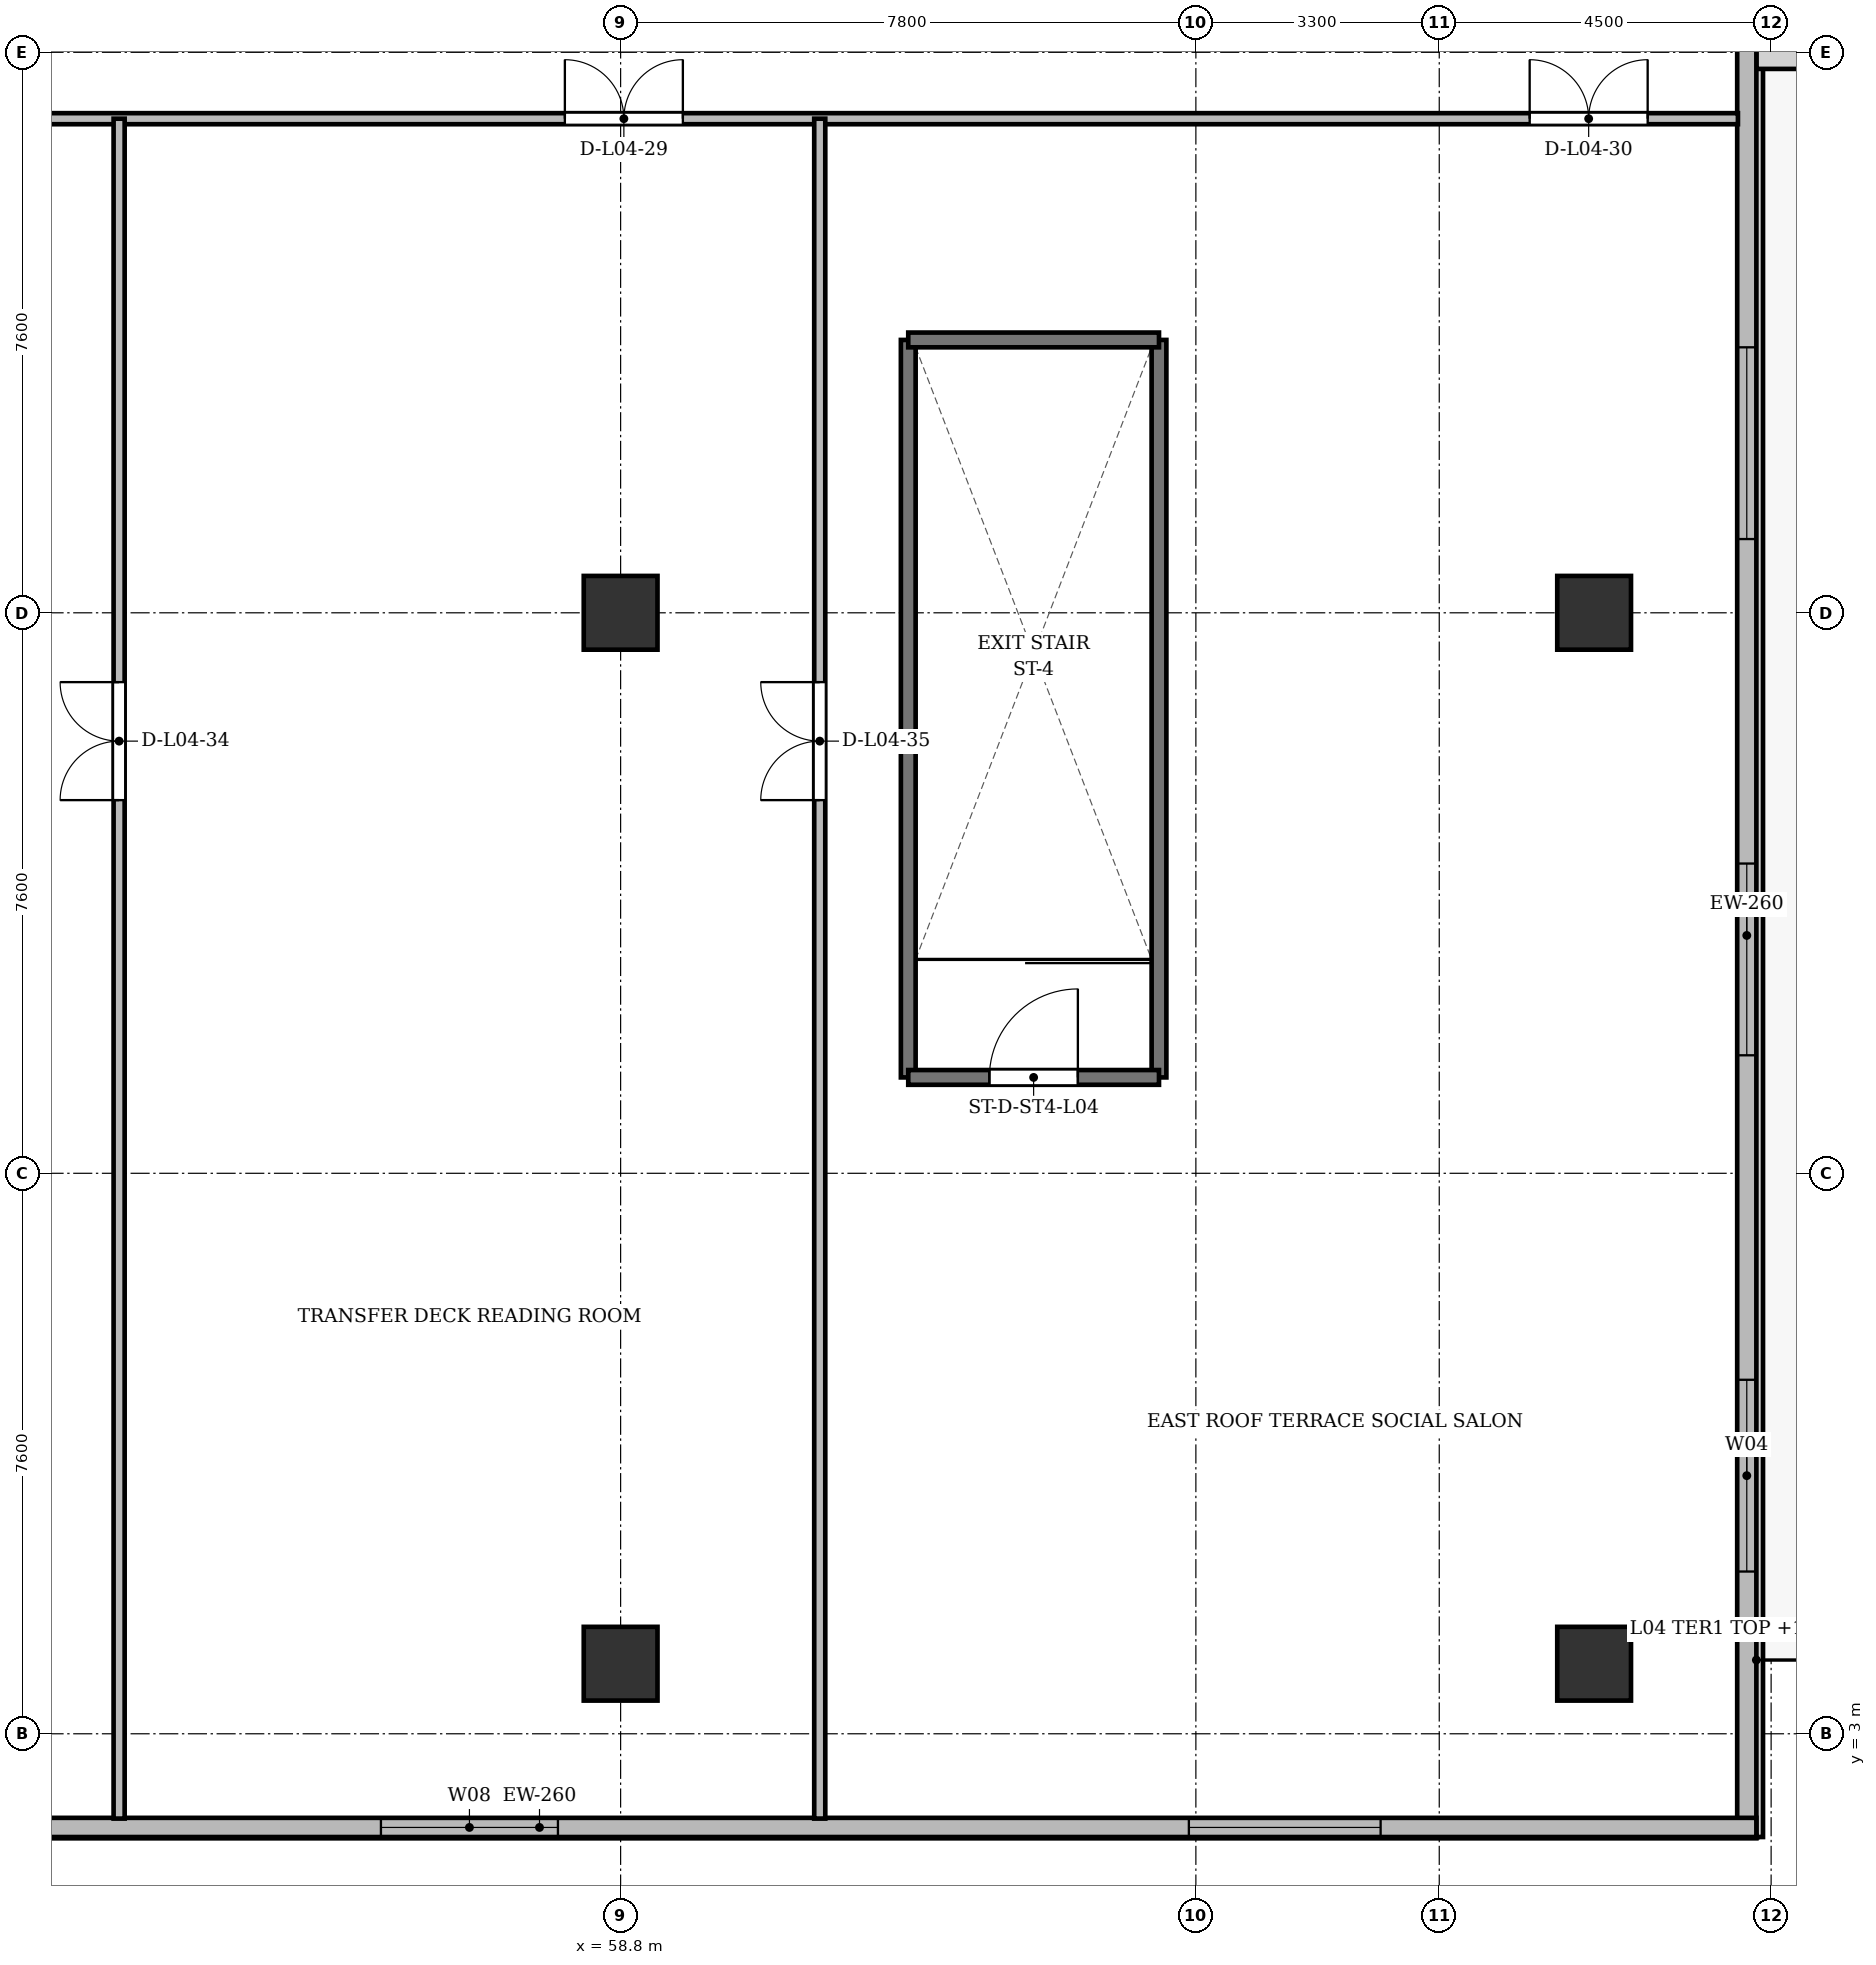
"""IFC4 building model, lengths in metres.
Left out: names, types, materials, properties, quantities, classifications, styles, units other than length and angle.
Written with IfcOpenShell. Run it as: python <this file> out.ifc"""

import sys

from ifc_helpers import new_model, si_unit, direction, frame, frame_2d, origin, origin_2d, place, context, subcontext, project, spatial, rectangle, extrude, source, transform, mapped, element, fill, save


model = new_model("IFC4")
c1 = context("Model", 3, precision=1e-05, world=origin(), true_north=direction((0.0, 1.0)))
c2 = subcontext(c1, "Body", "Model", "MODEL_VIEW")
j1 = project(units=[si_unit("LENGTHUNIT", "METRE"), si_unit("PLANEANGLEUNIT", "RADIAN")], contexts=[c1])
p1 = place(None, origin())
s1 = spatial("IfcSite", under=j1, at=p1, CompositionType="ELEMENT")
p2 = place(p1, origin())
s2 = spatial("IfcBuilding", under=s1, at=p2, CompositionType="ELEMENT")
p3 = place(p2, frame((0.0, 0.0, 18.7)))
s3 = spatial("IfcBuildingStorey", under=s2, at=p3, CompositionType="ELEMENT", Elevation=18.7)
m1 = source(origin(), c2, "Body", "SweptSolid", [
    extrude(rectangle(XDim=1.0, YDim=1.0, at=origin_2d()), origin(), (0.0, 0.0, 1.0), 4.8),
])
for number, where, z_axis, x_axis in (
    (1, (58.8, 3.95, 0.0), (0.0, 0.0, 1.0), (1.0, 0.0, 0.0)),
    (2, (58.8, 18.2, 0.0), (0.0, 0.0, 1.0), (1.0, 0.0, 0.0)),
    (3, (72.0, 3.95, 0.0), (0.0, 0.0, 1.0), (1.0, 0.0, 0.0)),
    (4, (72.0, 18.2, 0.0), (0.0, 0.0, 1.0), (1.0, 0.0, 0.0)),
):
    element("IfcColumn", number, at=place(p3, frame(where, z_axis=z_axis, x_axis=x_axis)), inside=s3, PredefinedType="COLUMN", context=c2, shape_type="MappedRepresentation", body=[
        mapped(m1, transform((0.0, 0.0, 0.0), x_axis=(1.0, 0.0, 0.0), y_axis=(0.0, 1.0, 0.0), z_axis=(0.0, 0.0, 1.0), scale=1.0)),
    ])
p4 = place(p3, frame((74.07, 52.6, 0.0), z_axis=(0.0, 0.0, 1.0), x_axis=(0.0, -1.0, 0.0)))
e5 = element("IfcWall", 5, at=p4, inside=s3, PredefinedType="SOLIDWALL", context=c2, shape_type="SweptSolid", body=[
    extrude(rectangle(XDim=51.0, YDim=0.26, at=frame_2d((25.5, 0.0))), origin(), (0.0, 0.0, 1.0), 2.62),
])
p5 = place(p4, frame((24.75, 0.0, 0.0)))
e6 = element("IfcOpeningElement", 6, at=p5, cuts=e5, PredefinedType="OPENING", context=c2, shape_type="SweptSolid", body=[
    extrude(rectangle(XDim=1.5, YDim=2.25, at=frame_2d((0.75, 1.125))), frame((0.0, 0.14, 0.0), z_axis=(0.0, -1.0, 0.0), x_axis=(1.0, 0.0, 0.0)), (0.0, 0.0, 1.0), 0.28),
])
p6 = place(p4, frame((44.8, 0.0, 0.92)))
e7 = element("IfcOpeningElement", 7, at=p6, cuts=e5, PredefinedType="OPENING", context=c2, shape_type="SweptSolid", body=[
    extrude(rectangle(XDim=2.6, YDim=1.6, at=frame_2d((1.3, 0.8))), frame((0.0, 0.14, 0.0), z_axis=(0.0, -1.0, 0.0), x_axis=(1.0, 0.0, 0.0)), (0.0, 0.0, 1.0), 0.28),
])
p7 = place(p4, frame((37.8, 0.0, 0.92)))
e8 = element("IfcOpeningElement", 8, at=p7, cuts=e5, PredefinedType="OPENING", context=c2, shape_type="SweptSolid", body=[
    extrude(rectangle(XDim=2.6, YDim=1.6, at=frame_2d((1.3, 0.8))), frame((0.0, 0.14, 0.0), z_axis=(0.0, -1.0, 0.0), x_axis=(1.0, 0.0, 0.0)), (0.0, 0.0, 1.0), 0.28),
])
p8 = place(p4, frame((30.8, 0.0, 0.92)))
e9 = element("IfcOpeningElement", 9, at=p8, cuts=e5, PredefinedType="OPENING", context=c2, shape_type="SweptSolid", body=[
    extrude(rectangle(XDim=2.6, YDim=1.6, at=frame_2d((1.3, 0.8))), frame((0.0, 0.14, 0.0), z_axis=(0.0, -1.0, 0.0), x_axis=(1.0, 0.0, 0.0)), (0.0, 0.0, 1.0), 0.28),
])
p9 = place(p4, frame((14.5, 0.0, 0.92)))
e10 = element("IfcOpeningElement", 10, at=p9, cuts=e5, PredefinedType="OPENING", context=c2, shape_type="SweptSolid", body=[
    extrude(rectangle(XDim=2.6, YDim=1.6, at=frame_2d((1.3, 0.8))), frame((0.0, 0.14, 0.0), z_axis=(0.0, -1.0, 0.0), x_axis=(1.0, 0.0, 0.0)), (0.0, 0.0, 1.0), 0.28),
])
p10 = place(p4, frame((8.1, 0.0, 0.92)))
e11 = element("IfcOpeningElement", 11, at=p10, cuts=e5, PredefinedType="OPENING", context=c2, shape_type="SweptSolid", body=[
    extrude(rectangle(XDim=2.6, YDim=1.6, at=frame_2d((1.3, 0.8))), frame((0.0, 0.14, 0.0), z_axis=(0.0, -1.0, 0.0), x_axis=(1.0, 0.0, 0.0)), (0.0, 0.0, 1.0), 0.28),
])
p11 = place(p3, frame((74.2, 1.73, 0.0), z_axis=(0.0, 0.0, 1.0), x_axis=(-1.0, 0.0, 0.0)))
e12 = element("IfcWall", 12, at=p11, inside=s3, PredefinedType="SOLIDWALL", context=c2, shape_type="SweptSolid", body=[
    extrude(rectangle(XDim=33.0, YDim=0.26, at=frame_2d((16.5, 0.0))), origin(), (0.0, 0.0, 1.0), 4.42),
])
p12 = place(p11, frame((5.095, 0.0, 0.9)))
e13 = element("IfcOpeningElement", 13, at=p12, cuts=e12, PredefinedType="OPENING", context=c2, shape_type="SweptSolid", body=[
    extrude(rectangle(XDim=2.6, YDim=1.9, at=frame_2d((1.3, 0.95))), frame((0.0, 0.14, 0.0), z_axis=(0.0, -1.0, 0.0), x_axis=(1.0, 0.0, 0.0)), (0.0, 0.0, 1.0), 0.28),
])
p13 = place(p11, frame((16.25, 0.0, 0.9)))
e14 = element("IfcOpeningElement", 14, at=p13, cuts=e12, PredefinedType="OPENING", context=c2, shape_type="SweptSolid", body=[
    extrude(rectangle(XDim=2.4, YDim=2.1, at=frame_2d((1.2, 1.05))), frame((0.0, 0.14, 0.0), z_axis=(0.0, -1.0, 0.0), x_axis=(1.0, 0.0, 0.0)), (0.0, 0.0, 1.0), 0.28),
])
p14 = place(p11, frame((26.255, 0.0, 0.9)))
e15 = element("IfcOpeningElement", 15, at=p14, cuts=e12, PredefinedType="OPENING", context=c2, shape_type="SweptSolid", body=[
    extrude(rectangle(XDim=2.6, YDim=1.9, at=frame_2d((1.3, 0.95))), frame((0.0, 0.14, 0.0), z_axis=(0.0, -1.0, 0.0), x_axis=(1.0, 0.0, 0.0)), (0.0, 0.0, 1.0), 0.28),
])
for number, where, z_axis, x_axis in (
    (16, (62.7, 11.9, 0.0), (0.0, 0.0, 1.0), (0.0, 1.0, 0.0)),
    (17, (66.1, 11.9, 0.0), (0.0, 0.0, 1.0), (0.0, 1.0, 0.0)),
):
    element("IfcWall", number, at=place(p3, frame(where, z_axis=z_axis, x_axis=x_axis)), inside=s3, PredefinedType="SHEAR", context=c2, shape_type="SweptSolid", body=[
        extrude(rectangle(XDim=10.0, YDim=0.2, at=frame_2d((5.0, 0.0))), origin(), (0.0, 0.0, 1.0), 4.42),
    ])
p15 = place(p3, frame((62.7, 11.9, 0.0), z_axis=(0.0, 0.0, 1.0), x_axis=(1.0, 0.0, 0.0)))
e18 = element("IfcWall", 18, at=p15, inside=s3, PredefinedType="SHEAR", context=c2, shape_type="SweptSolid", body=[
    extrude(rectangle(XDim=3.4, YDim=0.2, at=frame_2d((1.7, 0.0))), origin(), (0.0, 0.0, 1.0), 4.42),
])
p16 = place(p15, frame((1.1, 0.0, 0.0)))
e19 = element("IfcOpeningElement", 19, at=p16, cuts=e18, PredefinedType="OPENING", context=c2, shape_type="SweptSolid", body=[
    extrude(rectangle(XDim=1.2, YDim=2.15, at=frame_2d((0.6, 1.075))), frame((0.0, 0.11, 0.0), z_axis=(0.0, -1.0, 0.0), x_axis=(1.0, 0.0, 0.0)), (0.0, 0.0, 1.0), 0.22),
])
p17 = place(p3, frame((62.7, 21.9, 0.0), z_axis=(0.0, 0.0, 1.0), x_axis=(1.0, 0.0, 0.0)))
e20 = element("IfcWall", 20, at=p17, inside=s3, PredefinedType="SHEAR", context=c2, shape_type="SweptSolid", body=[
    extrude(rectangle(XDim=3.4, YDim=0.2, at=frame_2d((1.7, 0.0))), origin(), (0.0, 0.0, 1.0), 4.42),
])
p18 = place(p3, frame((0.45, 24.9, 0.0), z_axis=(0.0, 0.0, 1.0), x_axis=(1.0, 0.0, 0.0)))
e21 = element("IfcWall", 21, at=p18, inside=s3, PredefinedType="PARTITIONING", context=c2, shape_type="SweptSolid", body=[
    extrude(rectangle(XDim=73.5, YDim=0.15, at=frame_2d((36.75, 0.0))), origin(), (0.0, 0.0, 1.0), 2.92),
])
p19 = place(p18, frame((1.765, 0.0, 0.0)))
e22 = element("IfcOpeningElement", 22, at=p19, cuts=e21, PredefinedType="OPENING", context=c2, shape_type="SweptSolid", body=[
    extrude(rectangle(XDim=1.6, YDim=2.2, at=frame_2d((0.8, 1.1))), frame((0.0, 0.085, 0.0), z_axis=(0.0, -1.0, 0.0), x_axis=(1.0, 0.0, 0.0)), (0.0, 0.0, 1.0), 0.17),
])
p20 = place(p18, frame((18.459, 0.0, 0.0)))
e23 = element("IfcOpeningElement", 23, at=p20, cuts=e21, PredefinedType="OPENING", context=c2, shape_type="SweptSolid", body=[
    extrude(rectangle(XDim=1.6, YDim=2.2, at=frame_2d((0.8, 1.1))), frame((0.0, 0.085, 0.0), z_axis=(0.0, -1.0, 0.0), x_axis=(1.0, 0.0, 0.0)), (0.0, 0.0, 1.0), 0.17),
])
p21 = place(p18, frame((32.478, 0.0, 0.0)))
e24 = element("IfcOpeningElement", 24, at=p21, cuts=e21, PredefinedType="OPENING", context=c2, shape_type="SweptSolid", body=[
    extrude(rectangle(XDim=1.6, YDim=2.2, at=frame_2d((0.8, 1.1))), frame((0.0, 0.085, 0.0), z_axis=(0.0, -1.0, 0.0), x_axis=(1.0, 0.0, 0.0)), (0.0, 0.0, 1.0), 0.17),
])
p22 = place(p18, frame((46.108, 0.0, 0.0)))
e25 = element("IfcOpeningElement", 25, at=p22, cuts=e21, PredefinedType="OPENING", context=c2, shape_type="SweptSolid", body=[
    extrude(rectangle(XDim=1.6, YDim=2.2, at=frame_2d((0.8, 1.1))), frame((0.0, 0.085, 0.0), z_axis=(0.0, -1.0, 0.0), x_axis=(1.0, 0.0, 0.0)), (0.0, 0.0, 1.0), 0.17),
])
p23 = place(p18, frame((57.594, 0.0, 0.0)))
e26 = element("IfcOpeningElement", 26, at=p23, cuts=e21, PredefinedType="OPENING", context=c2, shape_type="SweptSolid", body=[
    extrude(rectangle(XDim=1.6, YDim=2.2, at=frame_2d((0.8, 1.1))), frame((0.0, 0.085, 0.0), z_axis=(0.0, -1.0, 0.0), x_axis=(1.0, 0.0, 0.0)), (0.0, 0.0, 1.0), 0.17),
])
p24 = place(p18, frame((70.676, 0.0, 0.0)))
e27 = element("IfcOpeningElement", 27, at=p24, cuts=e21, PredefinedType="OPENING", context=c2, shape_type="SweptSolid", body=[
    extrude(rectangle(XDim=1.6, YDim=2.2, at=frame_2d((0.8, 1.1))), frame((0.0, 0.085, 0.0), z_axis=(0.0, -1.0, 0.0), x_axis=(1.0, 0.0, 0.0)), (0.0, 0.0, 1.0), 0.17),
])
p25 = place(p3, frame((52.0, 1.85, 0.0), z_axis=(0.0, 0.0, 1.0), x_axis=(0.0, 1.0, 0.0)))
e28 = element("IfcWall", 28, at=p25, inside=s3, PredefinedType="PARTITIONING", context=c2, shape_type="SweptSolid", body=[
    extrude(rectangle(XDim=23.05, YDim=0.15, at=frame_2d((11.525, 0.0))), origin(), (0.0, 0.0, 1.0), 2.62),
])
p26 = place(p25, frame((13.81, 0.0, 0.0)))
e29 = element("IfcOpeningElement", 29, at=p26, cuts=e28, PredefinedType="OPENING", context=c2, shape_type="SweptSolid", body=[
    extrude(rectangle(XDim=1.6, YDim=2.2, at=frame_2d((0.8, 1.1))), frame((0.0, 0.085, 0.0), z_axis=(0.0, -1.0, 0.0), x_axis=(1.0, 0.0, 0.0)), (0.0, 0.0, 1.0), 0.17),
])
p27 = place(p3, frame((61.5, 1.85, 0.0), z_axis=(0.0, 0.0, 1.0), x_axis=(0.0, 1.0, 0.0)))
e30 = element("IfcWall", 30, at=p27, inside=s3, PredefinedType="PARTITIONING", context=c2, shape_type="SweptSolid", body=[
    extrude(rectangle(XDim=23.05, YDim=0.15, at=frame_2d((11.525, 0.0))), origin(), (0.0, 0.0, 1.0), 2.62),
])
p28 = place(p27, frame((13.81, 0.0, 0.0)))
e31 = element("IfcOpeningElement", 31, at=p28, cuts=e30, PredefinedType="OPENING", context=c2, shape_type="SweptSolid", body=[
    extrude(rectangle(XDim=1.6, YDim=2.2, at=frame_2d((0.8, 1.1))), frame((0.0, 0.085, 0.0), z_axis=(0.0, -1.0, 0.0), x_axis=(1.0, 0.0, 0.0)), (0.0, 0.0, 1.0), 0.17),
])
m2 = source(origin(), c2, "Body", "SweptSolid", [
    extrude(rectangle(XDim=2.6, YDim=1.6, at=frame_2d((1.3, 0.8))), frame((0.0, 0.03, 0.0), z_axis=(0.0, -1.0, 0.0), x_axis=(1.0, 0.0, 0.0)), (0.0, 0.0, 1.0), 0.06),
])
p29 = place(p6, origin())
e32 = element("IfcWindow", 32, at=p29, inside=s3, PartitioningType="SINGLE_PANEL", PredefinedType="WINDOW", context=c2, shape_type="MappedRepresentation", body=[
    mapped(m2, transform((0.0, 0.0, 0.0), x_axis=(1.0, 0.0, 0.0), y_axis=(0.0, 1.0, 0.0), z_axis=(0.0, 0.0, 1.0), scale=1.0)),
])
fill(e7, e32)
p30 = place(p7, origin())
e33 = element("IfcWindow", 33, at=p30, inside=s3, PartitioningType="SINGLE_PANEL", PredefinedType="WINDOW", context=c2, shape_type="MappedRepresentation", body=[
    mapped(m2, transform((0.0, 0.0, 0.0), x_axis=(1.0, 0.0, 0.0), y_axis=(0.0, 1.0, 0.0), z_axis=(0.0, 0.0, 1.0), scale=1.0)),
])
fill(e8, e33)
p31 = place(p8, origin())
e34 = element("IfcWindow", 34, at=p31, inside=s3, PartitioningType="SINGLE_PANEL", PredefinedType="WINDOW", context=c2, shape_type="MappedRepresentation", body=[
    mapped(m2, transform((0.0, 0.0, 0.0), x_axis=(1.0, 0.0, 0.0), y_axis=(0.0, 1.0, 0.0), z_axis=(0.0, 0.0, 1.0), scale=1.0)),
])
fill(e9, e34)
m3 = source(origin(), c2, "Body", "SweptSolid", [
    extrude(rectangle(XDim=2.6, YDim=1.9, at=frame_2d((1.3, 0.95))), frame((0.0, 0.03, 0.0), z_axis=(0.0, -1.0, 0.0), x_axis=(1.0, 0.0, 0.0)), (0.0, 0.0, 1.0), 0.06),
])
p32 = place(p12, origin())
e35 = element("IfcWindow", 35, at=p32, inside=s3, PartitioningType="SINGLE_PANEL", PredefinedType="WINDOW", context=c2, shape_type="MappedRepresentation", body=[
    mapped(m3, transform((0.0, 0.0, 0.0), x_axis=(1.0, 0.0, 0.0), y_axis=(0.0, 1.0, 0.0), z_axis=(0.0, 0.0, 1.0), scale=1.0)),
])
fill(e13, e35)
m4 = source(origin(), c2, "Body", "SweptSolid", [
    extrude(rectangle(XDim=2.4, YDim=2.1, at=frame_2d((1.2, 1.05))), frame((0.0, 0.03, 0.0), z_axis=(0.0, -1.0, 0.0), x_axis=(1.0, 0.0, 0.0)), (0.0, 0.0, 1.0), 0.06),
])
p33 = place(p13, origin())
e36 = element("IfcWindow", 36, at=p33, inside=s3, PartitioningType="SINGLE_PANEL", PredefinedType="WINDOW", context=c2, shape_type="MappedRepresentation", body=[
    mapped(m4, transform((0.0, 0.0, 0.0), x_axis=(1.0, 0.0, 0.0), y_axis=(0.0, 1.0, 0.0), z_axis=(0.0, 0.0, 1.0), scale=1.0)),
])
fill(e14, e36)
m5 = source(origin(), c2, "Body", "SweptSolid", [
    extrude(rectangle(XDim=1.2, YDim=2.15, at=frame_2d((0.6, 1.075))), frame((0.0, 0.025, 0.0), z_axis=(0.0, -1.0, 0.0), x_axis=(1.0, 0.0, 0.0)), (0.0, 0.0, 1.0), 0.05),
])
p34 = place(p16, origin())
e37 = element("IfcDoor", 37, at=p34, inside=s3, OperationType="SINGLE_SWING_RIGHT", PredefinedType="DOOR", context=c2, shape_type="MappedRepresentation", body=[
    mapped(m5, transform((0.0, 0.0, 0.0), x_axis=(1.0, 0.0, 0.0), y_axis=(0.0, 1.0, 0.0), z_axis=(0.0, 0.0, 1.0), scale=1.0)),
])
fill(e19, e37)
m6 = source(origin(), c2, "Body", "SweptSolid", [
    extrude(rectangle(XDim=1.6, YDim=2.2, at=frame_2d((0.8, 1.1))), frame((0.0, 0.025, 0.0), z_axis=(0.0, -1.0, 0.0), x_axis=(1.0, 0.0, 0.0)), (0.0, 0.0, 1.0), 0.05),
])
p35 = place(p23, origin())
e38 = element("IfcDoor", 38, at=p35, inside=s3, OperationType="DOUBLE_DOOR_SINGLE_SWING", PredefinedType="DOOR", context=c2, shape_type="MappedRepresentation", body=[
    mapped(m6, transform((0.0, 0.0, 0.0), x_axis=(1.0, 0.0, 0.0), y_axis=(0.0, 1.0, 0.0), z_axis=(0.0, 0.0, 1.0), scale=1.0)),
])
fill(e26, e38)
p36 = place(p24, origin())
e39 = element("IfcDoor", 39, at=p36, inside=s3, OperationType="DOUBLE_DOOR_SINGLE_SWING", PredefinedType="DOOR", context=c2, shape_type="MappedRepresentation", body=[
    mapped(m6, transform((0.0, 0.0, 0.0), x_axis=(1.0, 0.0, 0.0), y_axis=(0.0, 1.0, 0.0), z_axis=(0.0, 0.0, 1.0), scale=1.0)),
])
fill(e27, e39)
p37 = place(p26, origin())
e40 = element("IfcDoor", 40, at=p37, inside=s3, OperationType="DOUBLE_DOOR_SINGLE_SWING", PredefinedType="DOOR", context=c2, shape_type="MappedRepresentation", body=[
    mapped(m6, transform((0.0, 0.0, 0.0), x_axis=(1.0, 0.0, 0.0), y_axis=(0.0, 1.0, 0.0), z_axis=(0.0, 0.0, 1.0), scale=1.0)),
])
fill(e29, e40)
p38 = place(p28, origin())
e41 = element("IfcDoor", 41, at=p38, inside=s3, OperationType="DOUBLE_DOOR_SINGLE_SWING", PredefinedType="DOOR", context=c2, shape_type="MappedRepresentation", body=[
    mapped(m6, transform((0.0, 0.0, 0.0), x_axis=(1.0, 0.0, 0.0), y_axis=(0.0, 1.0, 0.0), z_axis=(0.0, 0.0, 1.0), scale=1.0)),
])
fill(e31, e41)
save(model, sys.argv[1])
